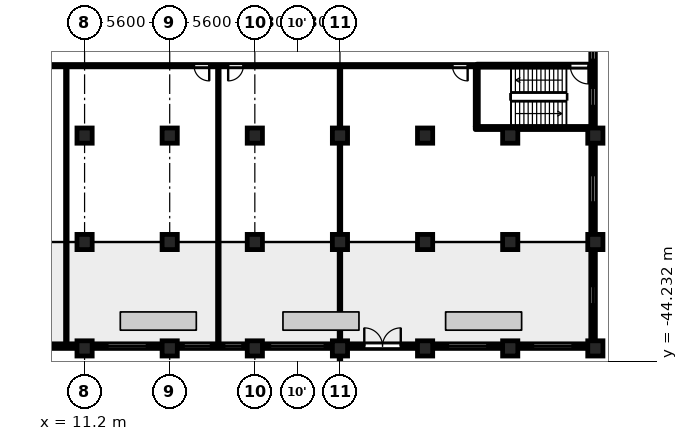
"""IFC4 building model, lengths in metres.
Left out: names, types, materials, properties, quantities, classifications, styles, units other than length and angle.
Written with IfcOpenShell. Run it as: python <this file> out.ifc"""

import sys

from ifc_helpers import new_model, si_unit, direction, frame, frame_2d, origin, origin_2d, place, context, subcontext, project, spatial, rectangle, circle, extrude, element, fill, save


model = new_model("IFC4")
c1 = context("Model", 3, precision=1e-05, world=origin(), true_north=direction((0.0, 1.0)))
c2 = subcontext(c1, "Body", "Model", "MODEL_VIEW")
j1 = project(units=[si_unit("LENGTHUNIT", "METRE"), si_unit("PLANEANGLEUNIT", "RADIAN")], contexts=[c1])
p1 = place(None, origin())
s1 = spatial("IfcSite", under=j1, at=p1, CompositionType="ELEMENT")
p2 = place(p1, origin())
s2 = spatial("IfcBuilding", under=s1, at=p2, CompositionType="ELEMENT")
p3 = place(p2, frame((0.0, 0.0, 16.1)))
s3 = spatial("IfcBuildingStorey", under=s2, at=p3, CompositionType="ELEMENT", Elevation=16.1)
for number, where, z_axis, x_axis in (
    (1, (11.2, -29.4, 0.0), (0.0, 0.0, 1.0), (1.0, 0.0, 0.0)),
    (2, (16.8, -29.4, 0.0), (0.0, 0.0, 1.0), (1.0, 0.0, 0.0)),
    (3, (22.4, -29.4, 0.0), (0.0, 0.0, 1.0), (1.0, 0.0, 0.0)),
    (4, (28.0, -29.4, 0.0), (0.0, 0.0, 1.0), (1.0, 0.0, 0.0)),
    (5, (33.6, -29.4, 0.0), (0.0, 0.0, 1.0), (1.0, 0.0, 0.0)),
    (6, (39.2, -29.4, 0.0), (0.0, 0.0, 1.0), (1.0, 0.0, 0.0)),
    (7, (44.8, -29.4, 0.0), (0.0, 0.0, 1.0), (1.0, 0.0, 0.0)),
    (8, (11.2, -36.4, 0.0), (0.0, 0.0, 1.0), (1.0, 0.0, 0.0)),
    (9, (16.8, -36.4, 0.0), (0.0, 0.0, 1.0), (1.0, 0.0, 0.0)),
    (10, (22.4, -36.4, 0.0), (0.0, 0.0, 1.0), (1.0, 0.0, 0.0)),
    (11, (28.0, -36.4, 0.0), (0.0, 0.0, 1.0), (1.0, 0.0, 0.0)),
    (12, (33.6, -36.4, 0.0), (0.0, 0.0, 1.0), (1.0, 0.0, 0.0)),
    (13, (39.2, -36.4, 0.0), (0.0, 0.0, 1.0), (1.0, 0.0, 0.0)),
    (14, (44.8, -36.4, 0.0), (0.0, 0.0, 1.0), (1.0, 0.0, 0.0)),
    (15, (11.2, -43.4, 0.0), (0.0, 0.0, 1.0), (1.0, 0.0, 0.0)),
    (16, (16.8, -43.4, 0.0), (0.0, 0.0, 1.0), (1.0, 0.0, 0.0)),
    (17, (22.4, -43.4, 0.0), (0.0, 0.0, 1.0), (1.0, 0.0, 0.0)),
    (18, (28.0, -43.4, 0.0), (0.0, 0.0, 1.0), (1.0, 0.0, 0.0)),
    (19, (33.6, -43.4, 0.0), (0.0, 0.0, 1.0), (1.0, 0.0, 0.0)),
    (20, (39.2, -43.4, 0.0), (0.0, 0.0, 1.0), (1.0, 0.0, 0.0)),
    (21, (44.8, -43.4, 0.0), (0.0, 0.0, 1.0), (1.0, 0.0, 0.0)),
):
    element("IfcColumn", number, at=place(p3, frame(where, z_axis=z_axis, x_axis=x_axis)), inside=s3, PredefinedType="COLUMN", context=c2, shape_type="SweptSolid", body=[
        extrude(circle(Radius=0.5, at=origin_2d()), origin(), (0.0, 0.0, 1.0), 4.8),
    ])
p4 = place(p3, frame((44.65, -42.9, 0.0), z_axis=(0.0, 0.0, 1.0), x_axis=(0.0, 1.0, 0.0)))
e22 = element("IfcWall", 22, at=p4, inside=s3, PredefinedType="SOLIDWALL", context=c2, shape_type="SweptSolid", body=[
    extrude(rectangle(XDim=6.0, YDim=0.3, at=frame_2d((3.0, 0.0))), origin(), (0.0, 0.0, 1.0), 3.65),
])
p5 = place(p4, frame((2.4, 0.0, 0.6)))
e23 = element("IfcOpeningElement", 23, at=p5, cuts=e22, PredefinedType="OPENING", context=c2, shape_type="SweptSolid", body=[
    extrude(rectangle(XDim=1.2, YDim=1.55, at=frame_2d((0.6, 0.775))), frame((0.0, 0.16, 0.0), z_axis=(0.0, -1.0, 0.0), x_axis=(1.0, 0.0, 0.0)), (0.0, 0.0, 1.0), 0.32),
])
p6 = place(p3, frame((44.65, -35.9, 0.0), z_axis=(0.0, 0.0, 1.0), x_axis=(0.0, 1.0, 0.0)))
e24 = element("IfcWall", 24, at=p6, inside=s3, PredefinedType="SOLIDWALL", context=c2, shape_type="SweptSolid", body=[
    extrude(rectangle(XDim=6.0, YDim=0.3, at=frame_2d((3.0, 0.0))), origin(), (0.0, 0.0, 1.0), 3.65),
])
p7 = place(p6, frame((2.1, 0.0, 0.9)))
e25 = element("IfcOpeningElement", 25, at=p7, cuts=e24, PredefinedType="OPENING", context=c2, shape_type="SweptSolid", body=[
    extrude(rectangle(XDim=1.8, YDim=1.25, at=frame_2d((0.9, 0.625))), frame((0.0, 0.16, 0.0), z_axis=(0.0, -1.0, 0.0), x_axis=(1.0, 0.0, 0.0)), (0.0, 0.0, 1.0), 0.32),
])
p8 = place(p3, frame((44.65, -28.9, 0.0), z_axis=(0.0, 0.0, 1.0), x_axis=(0.0, 1.0, 0.0)))
e26 = element("IfcWall", 26, at=p8, inside=s3, PredefinedType="SOLIDWALL", context=c2, shape_type="SweptSolid", body=[
    extrude(rectangle(XDim=6.0, YDim=0.3, at=frame_2d((3.0, 0.0))), origin(), (0.0, 0.0, 1.0), 3.65),
])
p9 = place(p8, frame((1.45, 0.0, 0.6)))
e27 = element("IfcOpeningElement", 27, at=p9, cuts=e26, PredefinedType="OPENING", context=c2, shape_type="SweptSolid", body=[
    extrude(rectangle(XDim=1.2, YDim=1.55, at=frame_2d((0.6, 0.775))), frame((0.0, 0.16, 0.0), z_axis=(0.0, -1.0, 0.0), x_axis=(1.0, 0.0, 0.0)), (0.0, 0.0, 1.0), 0.32),
])
p10 = place(p8, frame((4.488, 0.0, 0.6)))
e28 = element("IfcOpeningElement", 28, at=p10, cuts=e26, PredefinedType="OPENING", context=c2, shape_type="SweptSolid", body=[
    extrude(rectangle(XDim=1.2, YDim=1.55, at=frame_2d((0.6, 0.775))), frame((0.0, 0.16, 0.0), z_axis=(0.0, -1.0, 0.0), x_axis=(1.0, 0.0, 0.0)), (0.0, 0.0, 1.0), 0.32),
])
p11 = place(p3, frame((6.1, -43.25, 0.0), z_axis=(0.0, 0.0, 1.0), x_axis=(1.0, 0.0, 0.0)))
e29 = element("IfcWall", 29, at=p11, inside=s3, PredefinedType="SOLIDWALL", context=c2, shape_type="SweptSolid", body=[
    extrude(rectangle(XDim=4.6, YDim=0.3, at=frame_2d((2.3, 0.0))), origin(), (0.0, 0.0, 1.0), 3.65),
])
p12 = place(p11, frame((1.312, 0.0, 0.6)))
e30 = element("IfcOpeningElement", 30, at=p12, cuts=e29, PredefinedType="OPENING", context=c2, shape_type="SweptSolid", body=[
    extrude(rectangle(XDim=1.2, YDim=1.55, at=frame_2d((0.6, 0.775))), frame((0.0, 0.16, 0.0), z_axis=(0.0, -1.0, 0.0), x_axis=(1.0, 0.0, 0.0)), (0.0, 0.0, 1.0), 0.32),
])
p13 = place(p3, frame((11.7, -43.25, 0.0), z_axis=(0.0, 0.0, 1.0), x_axis=(1.0, 0.0, 0.0)))
e31 = element("IfcWall", 31, at=p13, inside=s3, PredefinedType="SOLIDWALL", context=c2, shape_type="SweptSolid", body=[
    extrude(rectangle(XDim=4.6, YDim=0.3, at=frame_2d((2.3, 0.0))), origin(), (0.0, 0.0, 1.0), 3.65),
])
p14 = place(p13, frame((1.0, 0.0, 0.9)))
e32 = element("IfcOpeningElement", 32, at=p14, cuts=e31, PredefinedType="OPENING", context=c2, shape_type="SweptSolid", body=[
    extrude(rectangle(XDim=2.6, YDim=1.25, at=frame_2d((1.3, 0.625))), frame((0.0, 0.16, 0.0), z_axis=(0.0, -1.0, 0.0), x_axis=(1.0, 0.0, 0.0)), (0.0, 0.0, 1.0), 0.32),
])
p15 = place(p3, frame((17.3, -43.25, 0.0), z_axis=(0.0, 0.0, 1.0), x_axis=(1.0, 0.0, 0.0)))
e33 = element("IfcWall", 33, at=p15, inside=s3, PredefinedType="SOLIDWALL", context=c2, shape_type="SweptSolid", body=[
    extrude(rectangle(XDim=4.6, YDim=0.3, at=frame_2d((2.3, 0.0))), origin(), (0.0, 0.0, 1.0), 3.65),
])
p16 = place(p15, frame((0.41, 0.0, 0.9)))
e34 = element("IfcOpeningElement", 34, at=p16, cuts=e33, PredefinedType="OPENING", context=c2, shape_type="SweptSolid", body=[
    extrude(rectangle(XDim=1.8, YDim=1.25, at=frame_2d((0.9, 0.625))), frame((0.0, 0.16, 0.0), z_axis=(0.0, -1.0, 0.0), x_axis=(1.0, 0.0, 0.0)), (0.0, 0.0, 1.0), 0.32),
])
p17 = place(p15, frame((3.085, 0.0, 0.6)))
e35 = element("IfcOpeningElement", 35, at=p17, cuts=e33, PredefinedType="OPENING", context=c2, shape_type="SweptSolid", body=[
    extrude(rectangle(XDim=1.2, YDim=1.55, at=frame_2d((0.6, 0.775))), frame((0.0, 0.16, 0.0), z_axis=(0.0, -1.0, 0.0), x_axis=(1.0, 0.0, 0.0)), (0.0, 0.0, 1.0), 0.32),
])
p18 = place(p3, frame((22.9, -43.25, 0.0), z_axis=(0.0, 0.0, 1.0), x_axis=(1.0, 0.0, 0.0)))
e36 = element("IfcWall", 36, at=p18, inside=s3, PredefinedType="SOLIDWALL", context=c2, shape_type="SweptSolid", body=[
    extrude(rectangle(XDim=4.6, YDim=0.3, at=frame_2d((2.3, 0.0))), origin(), (0.0, 0.0, 1.0), 3.65),
])
p19 = place(p18, frame((0.5, 0.0, 1.2)))
e37 = element("IfcOpeningElement", 37, at=p19, cuts=e36, PredefinedType="OPENING", context=c2, shape_type="SweptSolid", body=[
    extrude(rectangle(XDim=3.6, YDim=0.95, at=frame_2d((1.8, 0.475))), frame((0.0, 0.16, 0.0), z_axis=(0.0, -1.0, 0.0), x_axis=(1.0, 0.0, 0.0)), (0.0, 0.0, 1.0), 0.32),
])
p20 = place(p3, frame((28.5, -43.25, 0.0), z_axis=(0.0, 0.0, 1.0), x_axis=(1.0, 0.0, 0.0)))
e38 = element("IfcWall", 38, at=p20, inside=s3, PredefinedType="SOLIDWALL", context=c2, shape_type="SweptSolid", body=[
    extrude(rectangle(XDim=4.6, YDim=0.3, at=frame_2d((2.3, 0.0))), origin(), (0.0, 0.0, 1.0), 3.65),
])
p21 = place(p20, frame((1.1, 0.0, 0.0)))
e39 = element("IfcOpeningElement", 39, at=p21, cuts=e38, PredefinedType="OPENING", context=c2, shape_type="SweptSolid", body=[
    extrude(rectangle(XDim=2.4, YDim=2.3, at=frame_2d((1.2, 1.15))), frame((0.0, 0.16, 0.0), z_axis=(0.0, -1.0, 0.0), x_axis=(1.0, 0.0, 0.0)), (0.0, 0.0, 1.0), 0.32),
])
p22 = place(p3, frame((34.1, -43.25, 0.0), z_axis=(0.0, 0.0, 1.0), x_axis=(1.0, 0.0, 0.0)))
e40 = element("IfcWall", 40, at=p22, inside=s3, PredefinedType="SOLIDWALL", context=c2, shape_type="SweptSolid", body=[
    extrude(rectangle(XDim=4.6, YDim=0.3, at=frame_2d((2.3, 0.0))), origin(), (0.0, 0.0, 1.0), 3.65),
])
p23 = place(p22, frame((1.0, 0.0, 0.9)))
e41 = element("IfcOpeningElement", 41, at=p23, cuts=e40, PredefinedType="OPENING", context=c2, shape_type="SweptSolid", body=[
    extrude(rectangle(XDim=2.6, YDim=1.25, at=frame_2d((1.3, 0.625))), frame((0.0, 0.16, 0.0), z_axis=(0.0, -1.0, 0.0), x_axis=(1.0, 0.0, 0.0)), (0.0, 0.0, 1.0), 0.32),
])
p24 = place(p3, frame((39.7, -43.25, 0.0), z_axis=(0.0, 0.0, 1.0), x_axis=(1.0, 0.0, 0.0)))
e42 = element("IfcWall", 42, at=p24, inside=s3, PredefinedType="SOLIDWALL", context=c2, shape_type="SweptSolid", body=[
    extrude(rectangle(XDim=4.6, YDim=0.3, at=frame_2d((2.3, 0.0))), origin(), (0.0, 0.0, 1.0), 3.65),
])
p25 = place(p24, frame((1.0, 0.0, 0.9)))
e43 = element("IfcOpeningElement", 43, at=p25, cuts=e42, PredefinedType="OPENING", context=c2, shape_type="SweptSolid", body=[
    extrude(rectangle(XDim=2.6, YDim=1.25, at=frame_2d((1.3, 0.625))), frame((0.0, 0.16, 0.0), z_axis=(0.0, -1.0, 0.0), x_axis=(1.0, 0.0, 0.0)), (0.0, 0.0, 1.0), 0.32),
])
p26 = place(p3, frame((36.9, -28.9, 0.0), z_axis=(0.0, 0.0, 1.0), x_axis=(1.0, 0.0, 0.0)))
e44 = element("IfcWall", 44, at=p26, inside=s3, PredefinedType="SHEAR", context=c2, shape_type="SweptSolid", body=[
    extrude(rectangle(XDim=7.81, YDim=0.2, at=frame_2d((3.905, 0.0))), origin(), (0.0, 0.0, 1.0), 4.45),
])
p27 = place(p3, frame((-37.0, -24.8, 0.0), z_axis=(0.0, 0.0, 1.0), x_axis=(1.0, 0.0, 0.0)))
e45 = element("IfcWall", 45, at=p27, inside=s3, PredefinedType="PARTITIONING", context=c2, shape_type="SweptSolid", body=[
    extrude(rectangle(XDim=74.0, YDim=0.15, at=frame_2d((37.0, 0.0))), origin(), (0.0, 0.0, 1.0), 4.45),
])
p28 = place(p27, frame((2.65, 0.0, 0.0)))
e46 = element("IfcOpeningElement", 46, at=p28, cuts=e45, PredefinedType="OPENING", context=c2, shape_type="SweptSolid", body=[
    extrude(rectangle(XDim=1.0, YDim=2.1, at=frame_2d((0.5, 1.05))), frame((0.0, 0.085, 0.0), z_axis=(0.0, -1.0, 0.0), x_axis=(1.0, 0.0, 0.0)), (0.0, 0.0, 1.0), 0.17),
])
p29 = place(p27, frame((4.85, 0.0, 0.0)))
e47 = element("IfcOpeningElement", 47, at=p29, cuts=e45, PredefinedType="OPENING", context=c2, shape_type="SweptSolid", body=[
    extrude(rectangle(XDim=1.0, YDim=2.1, at=frame_2d((0.5, 1.05))), frame((0.0, 0.085, 0.0), z_axis=(0.0, -1.0, 0.0), x_axis=(1.0, 0.0, 0.0)), (0.0, 0.0, 1.0), 0.17),
])
p30 = place(p27, frame((35.35, 0.0, 0.0)))
e48 = element("IfcOpeningElement", 48, at=p30, cuts=e45, PredefinedType="OPENING", context=c2, shape_type="SweptSolid", body=[
    extrude(rectangle(XDim=1.0, YDim=2.1, at=frame_2d((0.5, 1.05))), frame((0.0, 0.085, 0.0), z_axis=(0.0, -1.0, 0.0), x_axis=(1.0, 0.0, 0.0)), (0.0, 0.0, 1.0), 0.17),
])
p31 = place(p27, frame((37.65, 0.0, 0.0)))
e49 = element("IfcOpeningElement", 49, at=p31, cuts=e45, PredefinedType="OPENING", context=c2, shape_type="SweptSolid", body=[
    extrude(rectangle(XDim=1.0, YDim=2.1, at=frame_2d((0.5, 1.05))), frame((0.0, 0.085, 0.0), z_axis=(0.0, -1.0, 0.0), x_axis=(1.0, 0.0, 0.0)), (0.0, 0.0, 1.0), 0.17),
])
p32 = place(p27, frame((55.4, 0.0, 0.0)))
e50 = element("IfcOpeningElement", 50, at=p32, cuts=e45, PredefinedType="OPENING", context=c2, shape_type="SweptSolid", body=[
    extrude(rectangle(XDim=1.0, YDim=2.1, at=frame_2d((0.5, 1.05))), frame((0.0, 0.085, 0.0), z_axis=(0.0, -1.0, 0.0), x_axis=(1.0, 0.0, 0.0)), (0.0, 0.0, 1.0), 0.17),
])
p33 = place(p27, frame((57.645, 0.0, 0.0)))
e51 = element("IfcOpeningElement", 51, at=p33, cuts=e45, PredefinedType="OPENING", context=c2, shape_type="SweptSolid", body=[
    extrude(rectangle(XDim=1.0, YDim=2.1, at=frame_2d((0.5, 1.05))), frame((0.0, 0.085, 0.0), z_axis=(0.0, -1.0, 0.0), x_axis=(1.0, 0.0, 0.0)), (0.0, 0.0, 1.0), 0.17),
])
p34 = place(p27, frame((72.4, 0.0, 0.0)))
e52 = element("IfcOpeningElement", 52, at=p34, cuts=e45, PredefinedType="OPENING", context=c2, shape_type="SweptSolid", body=[
    extrude(rectangle(XDim=1.0, YDim=2.1, at=frame_2d((0.5, 1.05))), frame((0.0, 0.085, 0.0), z_axis=(0.0, -1.0, 0.0), x_axis=(1.0, 0.0, 0.0)), (0.0, 0.0, 1.0), 0.17),
])
p35 = place(p3, frame((37.0, -24.8, 0.0), z_axis=(0.0, 0.0, 1.0), x_axis=(1.0, 0.0, 0.0)))
e53 = element("IfcWall", 53, at=p35, inside=s3, PredefinedType="SHEAR", context=c2, shape_type="SweptSolid", body=[
    extrude(rectangle(XDim=7.71, YDim=0.2, at=frame_2d((3.855, 0.0))), origin(), (0.0, 0.0, 1.0), 4.45),
])
p36 = place(p35, frame((6.15, 0.0, 0.0)))
e54 = element("IfcOpeningElement", 54, at=p36, cuts=e53, PredefinedType="OPENING", context=c2, shape_type="SweptSolid", body=[
    extrude(rectangle(XDim=1.2, YDim=2.1, at=frame_2d((0.6, 1.05))), frame((0.0, 0.11, 0.0), z_axis=(0.0, -1.0, 0.0), x_axis=(1.0, 0.0, 0.0)), (0.0, 0.0, 1.0), 0.22),
])
for number, where, z_axis, x_axis in (
    (55, (10.0, -43.08, 0.0), (0.0, 0.0, 1.0), (0.0, 1.0, 0.0)),
    (56, (20.0, -43.08, 0.0), (0.0, 0.0, 1.0), (0.0, 1.0, 0.0)),
):
    element("IfcWall", number, at=place(p3, frame(where, z_axis=z_axis, x_axis=x_axis)), inside=s3, PredefinedType="PARTITIONING", context=c2, shape_type="SweptSolid", body=[
        extrude(rectangle(XDim=18.205, YDim=0.1, at=frame_2d((9.103, 0.0))), origin(), (0.0, 0.0, 1.0), 4.45),
    ])
p37 = place(p3, frame((28.0, -44.23, 0.0), z_axis=(0.0, 0.0, 1.0), x_axis=(0.0, 1.0, 0.0)))
e57 = element("IfcWall", 57, at=p37, inside=s3, PredefinedType="PARTITIONING", context=c2, shape_type="SweptSolid", body=[
    extrude(rectangle(XDim=19.355, YDim=0.1, at=frame_2d((9.677, 0.0))), origin(), (0.0, 0.0, 1.0), 4.45),
])
p38 = place(p3, frame((37.0, -28.8, 0.0), z_axis=(0.0, 0.0, 1.0), x_axis=(0.0, 1.0, 0.0)))
e58 = element("IfcWall", 58, at=p38, inside=s3, PredefinedType="SHEAR", context=c2, shape_type="SweptSolid", body=[
    extrude(rectangle(XDim=3.925, YDim=0.2, at=frame_2d((1.962, 0.0))), origin(), (0.0, 0.0, 1.0), 4.45),
])
p39 = place(p21, origin())
e59 = element("IfcDoor", 59, at=p39, inside=s3, OperationType="SINGLE_SWING_LEFT", PredefinedType="DOOR", context=c2, shape_type="SweptSolid", body=[
    extrude(rectangle(XDim=2.4, YDim=2.3, at=frame_2d((1.2, 1.15))), frame((0.0, 0.025, 0.0), z_axis=(0.0, -1.0, 0.0), x_axis=(1.0, 0.0, 0.0)), (0.0, 0.0, 1.0), 0.05),
])
fill(e39, e59)
p40 = place(p36, origin())
e60 = element("IfcDoor", 60, at=p40, inside=s3, OperationType="SINGLE_SWING_RIGHT", PredefinedType="DOOR", context=c2, shape_type="SweptSolid", body=[
    extrude(rectangle(XDim=1.2, YDim=2.1, at=frame_2d((0.6, 1.05))), frame((0.0, 0.025, 0.0), z_axis=(0.0, -1.0, 0.0), x_axis=(1.0, 0.0, 0.0)), (0.0, 0.0, 1.0), 0.05),
])
fill(e54, e60)
p41 = place(p32, origin())
e61 = element("IfcDoor", 61, at=p41, inside=s3, OperationType="SINGLE_SWING_RIGHT", PredefinedType="DOOR", context=c2, shape_type="SweptSolid", body=[
    extrude(rectangle(XDim=1.0, YDim=2.1, at=frame_2d((0.5, 1.05))), frame((0.0, 0.025, 0.0), z_axis=(0.0, -1.0, 0.0), x_axis=(1.0, 0.0, 0.0)), (0.0, 0.0, 1.0), 0.05),
])
fill(e50, e61)
p42 = place(p33, origin())
e62 = element("IfcDoor", 62, at=p42, inside=s3, OperationType="SINGLE_SWING_LEFT", PredefinedType="DOOR", context=c2, shape_type="SweptSolid", body=[
    extrude(rectangle(XDim=1.0, YDim=2.1, at=frame_2d((0.5, 1.05))), frame((0.0, 0.025, 0.0), z_axis=(0.0, -1.0, 0.0), x_axis=(1.0, 0.0, 0.0)), (0.0, 0.0, 1.0), 0.05),
])
fill(e51, e62)
p43 = place(p34, origin())
e63 = element("IfcDoor", 63, at=p43, inside=s3, OperationType="SINGLE_SWING_RIGHT", PredefinedType="DOOR", context=c2, shape_type="SweptSolid", body=[
    extrude(rectangle(XDim=1.0, YDim=2.1, at=frame_2d((0.5, 1.05))), frame((0.0, 0.025, 0.0), z_axis=(0.0, -1.0, 0.0), x_axis=(1.0, 0.0, 0.0)), (0.0, 0.0, 1.0), 0.05),
])
fill(e52, e63)
p44 = place(p5, origin())
e64 = element("IfcWindow", 64, at=p44, inside=s3, PartitioningType="SINGLE_PANEL", PredefinedType="WINDOW", context=c2, shape_type="SweptSolid", body=[
    extrude(rectangle(XDim=1.2, YDim=1.55, at=frame_2d((0.6, 0.775))), frame((0.0, 0.03, 0.0), z_axis=(0.0, -1.0, 0.0), x_axis=(1.0, 0.0, 0.0)), (0.0, 0.0, 1.0), 0.06),
])
fill(e23, e64)
p45 = place(p7, origin())
e65 = element("IfcWindow", 65, at=p45, inside=s3, PartitioningType="SINGLE_PANEL", PredefinedType="WINDOW", context=c2, shape_type="SweptSolid", body=[
    extrude(rectangle(XDim=1.8, YDim=1.25, at=frame_2d((0.9, 0.625))), frame((0.0, 0.03, 0.0), z_axis=(0.0, -1.0, 0.0), x_axis=(1.0, 0.0, 0.0)), (0.0, 0.0, 1.0), 0.06),
])
fill(e25, e65)
p46 = place(p9, origin())
e66 = element("IfcWindow", 66, at=p46, inside=s3, PartitioningType="SINGLE_PANEL", PredefinedType="WINDOW", context=c2, shape_type="SweptSolid", body=[
    extrude(rectangle(XDim=1.2, YDim=1.55, at=frame_2d((0.6, 0.775))), frame((0.0, 0.03, 0.0), z_axis=(0.0, -1.0, 0.0), x_axis=(1.0, 0.0, 0.0)), (0.0, 0.0, 1.0), 0.06),
])
fill(e27, e66)
p47 = place(p10, origin())
e67 = element("IfcWindow", 67, at=p47, inside=s3, PartitioningType="SINGLE_PANEL", PredefinedType="WINDOW", context=c2, shape_type="SweptSolid", body=[
    extrude(rectangle(XDim=1.2, YDim=1.55, at=frame_2d((0.6, 0.775))), frame((0.0, 0.03, 0.0), z_axis=(0.0, -1.0, 0.0), x_axis=(1.0, 0.0, 0.0)), (0.0, 0.0, 1.0), 0.06),
])
fill(e28, e67)
p48 = place(p14, origin())
e68 = element("IfcWindow", 68, at=p48, inside=s3, PartitioningType="SINGLE_PANEL", PredefinedType="WINDOW", context=c2, shape_type="SweptSolid", body=[
    extrude(rectangle(XDim=2.6, YDim=1.25, at=frame_2d((1.3, 0.625))), frame((0.0, 0.03, 0.0), z_axis=(0.0, -1.0, 0.0), x_axis=(1.0, 0.0, 0.0)), (0.0, 0.0, 1.0), 0.06),
])
fill(e32, e68)
p49 = place(p16, origin())
e69 = element("IfcWindow", 69, at=p49, inside=s3, PartitioningType="SINGLE_PANEL", PredefinedType="WINDOW", context=c2, shape_type="SweptSolid", body=[
    extrude(rectangle(XDim=1.8, YDim=1.25, at=frame_2d((0.9, 0.625))), frame((0.0, 0.03, 0.0), z_axis=(0.0, -1.0, 0.0), x_axis=(1.0, 0.0, 0.0)), (0.0, 0.0, 1.0), 0.06),
])
fill(e34, e69)
p50 = place(p17, origin())
e70 = element("IfcWindow", 70, at=p50, inside=s3, PartitioningType="SINGLE_PANEL", PredefinedType="WINDOW", context=c2, shape_type="SweptSolid", body=[
    extrude(rectangle(XDim=1.2, YDim=1.55, at=frame_2d((0.6, 0.775))), frame((0.0, 0.03, 0.0), z_axis=(0.0, -1.0, 0.0), x_axis=(1.0, 0.0, 0.0)), (0.0, 0.0, 1.0), 0.06),
])
fill(e35, e70)
p51 = place(p19, origin())
e71 = element("IfcWindow", 71, at=p51, inside=s3, PartitioningType="SINGLE_PANEL", PredefinedType="WINDOW", context=c2, shape_type="SweptSolid", body=[
    extrude(rectangle(XDim=3.6, YDim=0.95, at=frame_2d((1.8, 0.475))), frame((0.0, 0.03, 0.0), z_axis=(0.0, -1.0, 0.0), x_axis=(1.0, 0.0, 0.0)), (0.0, 0.0, 1.0), 0.06),
])
fill(e37, e71)
p52 = place(p23, origin())
e72 = element("IfcWindow", 72, at=p52, inside=s3, PartitioningType="SINGLE_PANEL", PredefinedType="WINDOW", context=c2, shape_type="SweptSolid", body=[
    extrude(rectangle(XDim=2.6, YDim=1.25, at=frame_2d((1.3, 0.625))), frame((0.0, 0.03, 0.0), z_axis=(0.0, -1.0, 0.0), x_axis=(1.0, 0.0, 0.0)), (0.0, 0.0, 1.0), 0.06),
])
fill(e41, e72)
p53 = place(p25, origin())
e73 = element("IfcWindow", 73, at=p53, inside=s3, PartitioningType="SINGLE_PANEL", PredefinedType="WINDOW", context=c2, shape_type="SweptSolid", body=[
    extrude(rectangle(XDim=2.6, YDim=1.25, at=frame_2d((1.3, 0.625))), frame((0.0, 0.03, 0.0), z_axis=(0.0, -1.0, 0.0), x_axis=(1.0, 0.0, 0.0)), (0.0, 0.0, 1.0), 0.06),
])
fill(e43, e73)
save(model, sys.argv[1])
